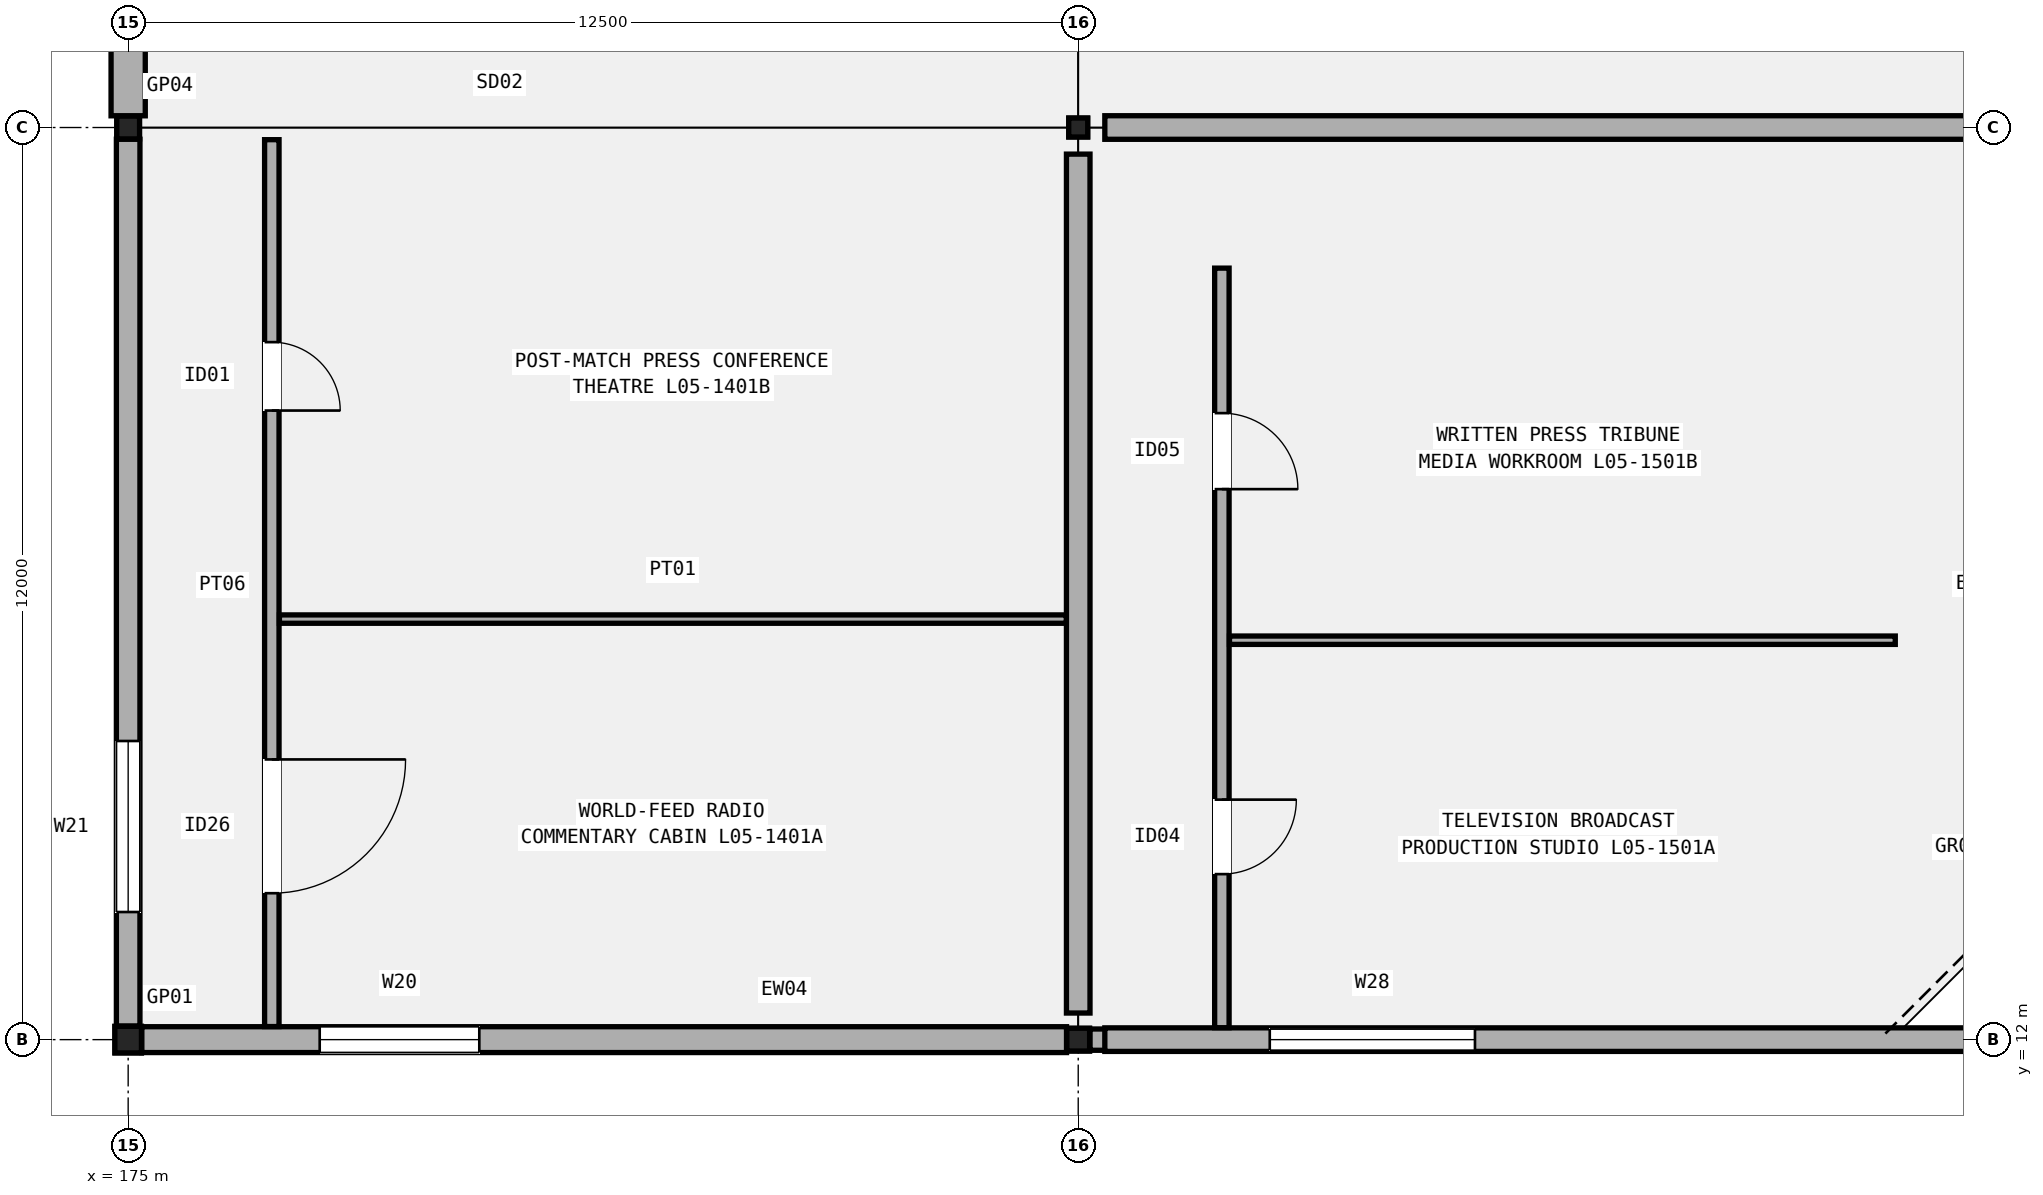
"""IFC4 building model, lengths in metres.
Left out: names, types, materials, properties, quantities, classifications, styles, units other than length and angle.
Written with IfcOpenShell. Run it as: python <this file> out.ifc"""

import sys

from ifc_helpers import new_model, si_unit, direction, frame, frame_2d, origin, origin_2d, place, context, subcontext, project, spatial, rectangle, hollow_rectangle, extrude, element, fill, save


model = new_model("IFC4")
c1 = context("Model", 3, precision=1e-05, world=origin(), true_north=direction((0.0, 1.0)))
c2 = subcontext(c1, "Body", "Model", "MODEL_VIEW")
j1 = project(units=[si_unit("LENGTHUNIT", "METRE"), si_unit("PLANEANGLEUNIT", "RADIAN")], contexts=[c1])
p1 = place(None, origin())
s1 = spatial("IfcSite", under=j1, at=p1, CompositionType="ELEMENT")
p2 = place(p1, origin())
s2 = spatial("IfcBuilding", under=s1, at=p2, CompositionType="ELEMENT")
p3 = place(p2, frame((0.0, 0.0, 25.8)))
s3 = spatial("IfcBuildingStorey", under=s2, at=p3, CompositionType="ELEMENT", Elevation=25.8)
p4 = place(p3, frame((175.0, 12.0, 0.0), z_axis=(0.0, 0.0, 1.0), x_axis=(1.0, 0.0, 0.0)))
e1 = element("IfcColumn", 1, at=p4, inside=s3, PredefinedType="COLUMN", context=c2, shape_type="SweptSolid", body=[
    extrude(hollow_rectangle(XDim=0.35, YDim=0.35, WallThickness=0.016, InnerFilletRadius=0.016, OuterFilletRadius=0.032, at=origin_2d()), origin(), (0.0, 0.0, 1.0), 5.4),
])
for number, where, z_axis, x_axis in (
    (2, (175.0, 24.0, 0.0), (0.0, 0.0, 1.0), (1.0, 0.0, 0.0)),
    (3, (187.5, 12.0, 0.0), (0.0, 0.0, 1.0), (1.0, 0.0, 0.0)),
):
    element("IfcColumn", number, at=place(p3, frame(where, z_axis=z_axis, x_axis=x_axis)), inside=s3, PredefinedType="COLUMN", context=c2, shape_type="SweptSolid", body=[
        extrude(hollow_rectangle(XDim=0.3, YDim=0.3, WallThickness=0.012, InnerFilletRadius=0.012, OuterFilletRadius=0.024, at=origin_2d()), origin(), (0.0, 0.0, 1.0), 5.4),
    ])
p5 = place(p3, frame((187.5, 24.0, 0.0), z_axis=(0.0, 0.0, 1.0), x_axis=(1.0, 0.0, 0.0)))
e4 = element("IfcColumn", 4, at=p5, inside=s3, PredefinedType="COLUMN", context=c2, shape_type="SweptSolid", body=[
    extrude(hollow_rectangle(XDim=0.25, YDim=0.25, WallThickness=0.012, InnerFilletRadius=0.012, OuterFilletRadius=0.024, at=origin_2d()), origin(), (0.0, 0.0, 1.0), 5.4),
])
p6 = place(p3, frame((175.179, 12.0, 0.0), z_axis=(0.0, 0.0, 1.0), x_axis=(1.0, 0.0, 0.0)))
e5 = element("IfcWall", 5, at=p6, inside=s3, PredefinedType="SOLIDWALL", context=c2, shape_type="SweptSolid", body=[
    extrude(rectangle(XDim=12.167, YDim=0.34, at=frame_2d((6.083, 0.0))), origin(), (0.0, 0.0, 1.0), 4.34),
])
p7 = place(p6, frame((2.341, 0.0, 0.95)))
e6 = element("IfcOpeningElement", 6, at=p7, cuts=e5, PredefinedType="OPENING", context=c2, shape_type="SweptSolid", body=[
    extrude(rectangle(XDim=2.1, YDim=2.6, at=frame_2d((1.05, 1.3))), frame((0.0, 0.18, 0.0), z_axis=(0.0, -1.0, 0.0), x_axis=(1.0, 0.0, 0.0)), (0.0, 0.0, 1.0), 0.36),
])
p8 = place(p3, frame((175.0, 12.179, 0.0), z_axis=(0.0, 0.0, 1.0), x_axis=(0.0, 1.0, 0.0)))
e7 = element("IfcWall", 7, at=p8, inside=s3, PredefinedType="SOLIDWALL", context=c2, shape_type="SweptSolid", body=[
    extrude(rectangle(XDim=11.667, YDim=0.31, at=frame_2d((5.833, 0.0))), origin(), (0.0, 0.0, 1.0), 4.34),
])
p9 = place(p8, frame((1.5, 0.0, 0.95)))
e8 = element("IfcOpeningElement", 8, at=p9, cuts=e7, PredefinedType="OPENING", context=c2, shape_type="SweptSolid", body=[
    extrude(rectangle(XDim=2.25, YDim=1.8, at=frame_2d((1.125, 0.9))), frame((0.0, 0.165, 0.0), z_axis=(0.0, -1.0, 0.0), x_axis=(1.0, 0.0, 0.0)), (0.0, 0.0, 1.0), 0.33),
])
p10 = place(p3, frame((175.0, 24.154, 0.0), z_axis=(0.0, 0.0, 1.0), x_axis=(0.0, 1.0, 0.0)))
e9 = element("IfcWall", 9, at=p10, inside=s3, PredefinedType="SOLIDWALL", context=c2, shape_type="SweptSolid", body=[
    extrude(rectangle(XDim=11.717, YDim=0.45, at=frame_2d((5.858, 0.0))), origin(), (0.0, 0.0, 1.0), 4.44),
])
p11 = place(p10, frame((1.5, 0.0, 0.95)))
e10 = element("IfcOpeningElement", 10, at=p11, cuts=e9, PredefinedType="OPENING", context=c2, shape_type="SweptSolid", body=[
    extrude(rectangle(XDim=2.4, YDim=1.65, at=frame_2d((1.2, 0.825))), frame((0.0, 0.235, 0.0), z_axis=(0.0, -1.0, 0.0), x_axis=(1.0, 0.0, 0.0)), (0.0, 0.0, 1.0), 0.47),
])
p12 = place(p3, frame((187.654, 12.0, 0.0), z_axis=(0.0, 0.0, 1.0), x_axis=(1.0, 0.0, 0.0)))
e11 = element("IfcWall", 11, at=p12, inside=s3, PredefinedType="SOLIDWALL", context=c2, shape_type="SweptSolid", body=[
    extrude(rectangle(XDim=12.217, YDim=0.28, at=frame_2d((6.108, 0.0))), origin(), (0.0, 0.0, 1.0), 4.44),
])
p13 = place(p12, frame((2.366, 0.0, 0.95)))
e12 = element("IfcOpeningElement", 12, at=p13, cuts=e11, PredefinedType="OPENING", context=c2, shape_type="SweptSolid", body=[
    extrude(rectangle(XDim=2.7, YDim=2.2, at=frame_2d((1.35, 1.1))), frame((0.0, 0.15, 0.0), z_axis=(0.0, -1.0, 0.0), x_axis=(1.0, 0.0, 0.0)), (0.0, 0.0, 1.0), 0.3),
])
p14 = place(p3, frame((187.85, 12.0, 5.4), z_axis=(0.0, 0.0, 1.0), x_axis=(1.0, 0.0, 0.0)))
e13 = element("IfcWall", 13, at=p14, inside=s3, PredefinedType="SOLIDWALL", context=c2, shape_type="SweptSolid", body=[
    extrude(rectangle(XDim=11.8, YDim=0.31, at=frame_2d((5.9, 0.0))), origin(), (0.0, 0.0, 1.0), 1.38),
])
p15 = place(p3, frame((187.85, 24.0, 5.4), z_axis=(0.0, 0.0, 1.0), x_axis=(1.0, 0.0, 0.0)))
e14 = element("IfcWall", 14, at=p15, inside=s3, PredefinedType="SOLIDWALL", context=c2, shape_type="SweptSolid", body=[
    extrude(rectangle(XDim=11.8, YDim=0.31, at=frame_2d((5.9, 0.0))), origin(), (0.0, 0.0, 1.0), 0.58),
])
p16 = place(p3, frame((187.5, 12.35, 5.4), z_axis=(0.0, 0.0, 1.0), x_axis=(0.0, 1.0, 0.0)))
e15 = element("IfcWall", 15, at=p16, inside=s3, PredefinedType="SOLIDWALL", context=c2, shape_type="SweptSolid", body=[
    extrude(rectangle(XDim=11.3, YDim=0.31, at=frame_2d((5.65, 0.0))), origin(), (0.0, 0.0, 1.0), 0.58),
])
p17 = place(p3, frame((176.89, 12.172, 0.0), z_axis=(0.0, 0.0, 1.0), x_axis=(0.0, 1.0, 0.0)))
e16 = element("IfcWall", 16, at=p17, inside=s3, PredefinedType="PARTITIONING", context=c2, shape_type="SweptSolid", body=[
    extrude(rectangle(XDim=11.668, YDim=0.19, at=frame_2d((5.834, 0.0))), origin(), (0.0, 0.0, 1.0), 4.35),
])
p18 = place(p17, frame((3.514, 0.0, 0.0), z_axis=(0.0, 0.0, 1.0), x_axis=(-1.0, 0.0, 0.0)))
e17 = element("IfcOpeningElement", 17, at=p18, cuts=e16, PredefinedType="OPENING", context=c2, shape_type="SweptSolid", body=[
    extrude(rectangle(XDim=1.76, YDim=2.3, at=frame_2d((0.88, 1.15))), frame((0.0, 0.105, 0.0), z_axis=(0.0, -1.0, 0.0), x_axis=(1.0, 0.0, 0.0)), (0.0, 0.0, 1.0), 0.21),
])
p19 = place(p17, frame((9.004, 0.0, 0.0), z_axis=(0.0, 0.0, 1.0), x_axis=(-1.0, 0.0, 0.0)))
e18 = element("IfcOpeningElement", 18, at=p19, cuts=e16, PredefinedType="OPENING", context=c2, shape_type="SweptSolid", body=[
    extrude(rectangle(XDim=0.9, YDim=2.06, at=frame_2d((0.45, 1.03))), frame((0.0, 0.105, 0.0), z_axis=(0.0, -1.0, 0.0), x_axis=(1.0, 0.0, 0.0)), (0.0, 0.0, 1.0), 0.21),
])
p20 = place(p3, frame((176.99, 17.533, 0.0), z_axis=(0.0, 0.0, 1.0), x_axis=(1.0, 0.0, 0.0)))
e19 = element("IfcWall", 19, at=p20, inside=s3, PredefinedType="PARTITIONING", context=c2, shape_type="SweptSolid", body=[
    extrude(rectangle(XDim=10.353, YDim=0.11, at=frame_2d((5.177, 0.0))), origin(), (0.0, 0.0, 1.0), 4.35),
])
p21 = place(p3, frame((189.39, 12.157, 0.0), z_axis=(0.0, 0.0, 1.0), x_axis=(0.0, 1.0, 0.0)))
e20 = element("IfcWall", 20, at=p21, inside=s3, PredefinedType="PARTITIONING", context=c2, shape_type="SweptSolid", body=[
    extrude(rectangle(XDim=9.993, YDim=0.19, at=frame_2d((4.997, 0.0))), origin(), (0.0, 0.0, 1.0), 4.35),
])
p22 = place(p21, frame((3.0, 0.0, 0.0), z_axis=(0.0, 0.0, 1.0), x_axis=(-1.0, 0.0, 0.0)))
e21 = element("IfcOpeningElement", 21, at=p22, cuts=e20, PredefinedType="OPENING", context=c2, shape_type="SweptSolid", body=[
    extrude(rectangle(XDim=0.98, YDim=2.1, at=frame_2d((0.49, 1.05))), frame((0.0, 0.105, 0.0), z_axis=(0.0, -1.0, 0.0), x_axis=(1.0, 0.0, 0.0)), (0.0, 0.0, 1.0), 0.21),
])
p23 = place(p21, frame((8.085, 0.0, 0.0), z_axis=(0.0, 0.0, 1.0), x_axis=(-1.0, 0.0, 0.0)))
e22 = element("IfcOpeningElement", 22, at=p23, cuts=e20, PredefinedType="OPENING", context=c2, shape_type="SweptSolid", body=[
    extrude(rectangle(XDim=1.0, YDim=2.14, at=frame_2d((0.5, 1.07))), frame((0.0, 0.105, 0.0), z_axis=(0.0, -1.0, 0.0), x_axis=(1.0, 0.0, 0.0)), (0.0, 0.0, 1.0), 0.21),
])
p24 = place(p3, frame((189.49, 17.255, 0.0), z_axis=(0.0, 0.0, 1.0), x_axis=(1.0, 0.0, 0.0)))
e23 = element("IfcWall", 23, at=p24, inside=s3, PredefinedType="PARTITIONING", context=c2, shape_type="SweptSolid", body=[
    extrude(rectangle(XDim=8.76, YDim=0.11, at=frame_2d((4.38, 0.0))), origin(), (0.0, 0.0, 1.0), 4.35),
])
p25 = place(p7, origin())
e24 = element("IfcWindow", 24, at=p25, inside=s3, PartitioningType="SINGLE_PANEL", PredefinedType="WINDOW", context=c2, shape_type="SweptSolid", body=[
    extrude(rectangle(XDim=2.1, YDim=2.6, at=frame_2d((1.05, 1.3))), frame((0.0, 0.03, 0.0), z_axis=(0.0, -1.0, 0.0), x_axis=(1.0, 0.0, 0.0)), (0.0, 0.0, 1.0), 0.06),
])
fill(e6, e24)
p26 = place(p9, origin())
e25 = element("IfcWindow", 25, at=p26, inside=s3, PartitioningType="SINGLE_PANEL", PredefinedType="WINDOW", context=c2, shape_type="SweptSolid", body=[
    extrude(rectangle(XDim=2.25, YDim=1.8, at=frame_2d((1.125, 0.9))), frame((0.0, 0.03, 0.0), z_axis=(0.0, -1.0, 0.0), x_axis=(1.0, 0.0, 0.0)), (0.0, 0.0, 1.0), 0.06),
])
fill(e8, e25)
p27 = place(p13, origin())
e26 = element("IfcWindow", 26, at=p27, inside=s3, PartitioningType="SINGLE_PANEL", PredefinedType="WINDOW", context=c2, shape_type="SweptSolid", body=[
    extrude(rectangle(XDim=2.7, YDim=2.2, at=frame_2d((1.35, 1.1))), frame((0.0, 0.03, 0.0), z_axis=(0.0, -1.0, 0.0), x_axis=(1.0, 0.0, 0.0)), (0.0, 0.0, 1.0), 0.06),
])
fill(e12, e26)
p28 = place(p18, origin())
e27 = element("IfcDoor", 27, at=p28, inside=s3, OperationType="SINGLE_SWING_LEFT", PredefinedType="DOOR", context=c2, shape_type="SweptSolid", body=[
    extrude(rectangle(XDim=1.76, YDim=2.3, at=frame_2d((0.88, 1.15))), frame((0.0, 0.025, 0.0), z_axis=(0.0, -1.0, 0.0), x_axis=(1.0, 0.0, 0.0)), (0.0, 0.0, 1.0), 0.05),
])
fill(e17, e27)
p29 = place(p19, origin())
e28 = element("IfcDoor", 28, at=p29, inside=s3, OperationType="SINGLE_SWING_RIGHT", PredefinedType="DOOR", context=c2, shape_type="SweptSolid", body=[
    extrude(rectangle(XDim=0.9, YDim=2.06, at=frame_2d((0.45, 1.03))), frame((0.0, 0.025, 0.0), z_axis=(0.0, -1.0, 0.0), x_axis=(1.0, 0.0, 0.0)), (0.0, 0.0, 1.0), 0.05),
])
fill(e18, e28)
p30 = place(p22, origin())
e29 = element("IfcDoor", 29, at=p30, inside=s3, OperationType="SINGLE_SWING_LEFT", PredefinedType="DOOR", context=c2, shape_type="SweptSolid", body=[
    extrude(rectangle(XDim=0.98, YDim=2.1, at=frame_2d((0.49, 1.05))), frame((0.0, 0.025, 0.0), z_axis=(0.0, -1.0, 0.0), x_axis=(1.0, 0.0, 0.0)), (0.0, 0.0, 1.0), 0.05),
])
fill(e21, e29)
p31 = place(p23, origin())
e30 = element("IfcDoor", 30, at=p31, inside=s3, OperationType="SINGLE_SWING_RIGHT", PredefinedType="DOOR", context=c2, shape_type="SweptSolid", body=[
    extrude(rectangle(XDim=1.0, YDim=2.14, at=frame_2d((0.5, 1.07))), frame((0.0, 0.025, 0.0), z_axis=(0.0, -1.0, 0.0), x_axis=(1.0, 0.0, 0.0)), (0.0, 0.0, 1.0), 0.05),
])
fill(e22, e30)
save(model, sys.argv[1])
